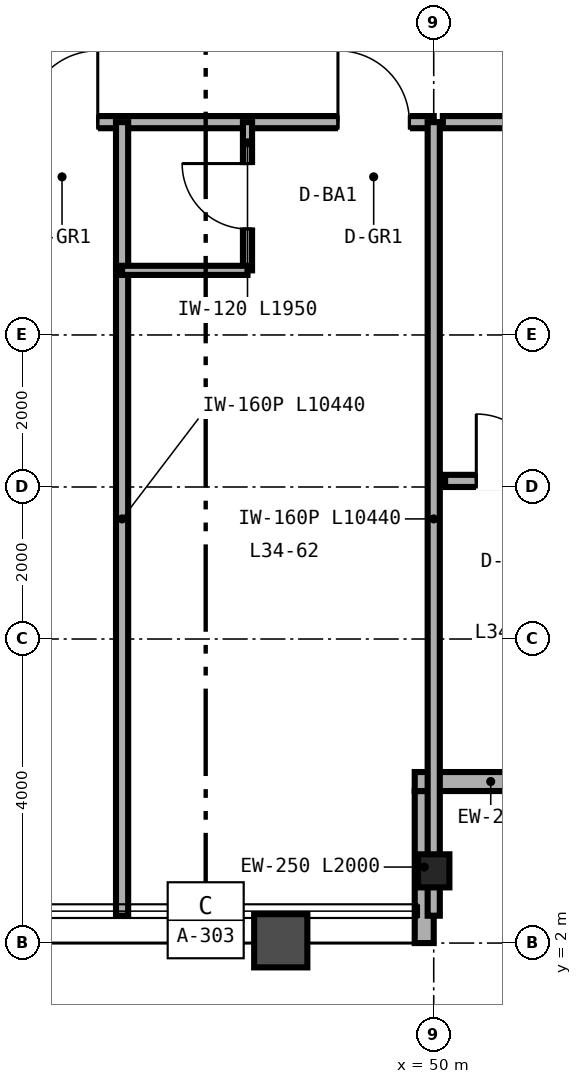
"""IFC4 building model, lengths in metres.
Left out: names, types, materials, properties, quantities, classifications, styles, units other than length and angle.
Written with IfcOpenShell. Run it as: python <this file> out.ifc"""

import sys

from ifc_helpers import new_model, si_unit, direction, frame, frame_2d, origin, origin_2d, place, context, subcontext, project, spatial, rectangle, i_section, extrude, source, transform, mapped, element, fill, save


model = new_model("IFC4")
c1 = context("Model", 3, precision=1e-05, world=origin(), true_north=direction((0.0, 1.0)))
c2 = subcontext(c1, "Body", "Model", "MODEL_VIEW")
j1 = project(units=[si_unit("LENGTHUNIT", "METRE"), si_unit("PLANEANGLEUNIT", "RADIAN")], contexts=[c1])
p1 = place(None, origin())
s1 = spatial("IfcSite", under=j1, at=p1, CompositionType="ELEMENT")
p2 = place(p1, origin())
s2 = spatial("IfcBuilding", under=s1, at=p2, CompositionType="ELEMENT")
p3 = place(p2, frame((0.0, 0.0, 136.8)))
s3 = spatial("IfcBuildingStorey", under=s2, at=p3, CompositionType="ELEMENT", Elevation=136.8)
m1 = source(origin(), c2, "Body", "SweptSolid", [
    extrude(i_section(OverallWidth=0.412, OverallDepth=0.435, WebThickness=0.036, FlangeThickness=0.057, FilletRadius=0.025, at=origin_2d()), origin(), (0.0, 0.0, 1.0), 3.36),
])
p4 = place(p3, frame((50.0, 2.95, 0.0), z_axis=(0.0, 0.0, 1.0), x_axis=(1.0, 0.0, 0.0)))
e1 = element("IfcColumn", 1, at=p4, inside=s3, PredefinedType="COLUMN", context=c2, shape_type="MappedRepresentation", body=[
    mapped(m1, transform((0.0, 0.0, 0.0), scale=1.0)),
])
p5 = place(p3, frame((49.875, 2.0, 0.0), z_axis=(0.0, 0.0, 1.0), x_axis=(0.0, 1.0, 0.0)))
e2 = element("IfcWall", 2, at=p5, inside=s3, PredefinedType="SOLIDWALL", context=c2, shape_type="SweptSolid", body=[
    extrude(rectangle(XDim=2.0, YDim=0.25, at=frame_2d((1.0, 0.0))), origin(), (0.0, 0.0, 1.0), 2.667),
])
p6 = place(p3, frame((49.75, 4.125, 0.0), z_axis=(0.0, 0.0, 1.0), x_axis=(1.0, 0.0, 0.0)))
e3 = element("IfcWall", 3, at=p6, inside=s3, PredefinedType="SOLIDWALL", context=c2, shape_type="SweptSolid", body=[
    extrude(rectangle(XDim=2.0, YDim=0.25, at=frame_2d((1.0, 0.0))), origin(), (0.0, 0.0, 1.0), 3.36),
])
p7 = place(p3, frame((50.12, 12.8, 0.0), z_axis=(0.0, 0.0, 1.0), x_axis=(1.0, 0.0, 0.0)))
e4 = element("IfcWall", 4, at=p7, inside=s3, PredefinedType="PARTITIONING", context=c2, shape_type="SweptSolid", body=[
    extrude(rectangle(XDim=5.68, YDim=0.16, at=frame_2d((2.84, 0.0))), origin(), (0.0, 0.0, 1.0), 3.36),
])
p8 = place(p7, frame((2.36, 0.0, 0.0)))
e5 = element("IfcOpeningElement", 5, at=p8, cuts=e4, PredefinedType="OPENING", context=c2, shape_type="SweptSolid", body=[
    extrude(rectangle(XDim=0.96, YDim=2.15, at=frame_2d((0.48, 1.075))), frame((0.0, 0.09, 0.0), z_axis=(0.0, -1.0, 0.0), x_axis=(1.0, 0.0, 0.0)), (0.0, 0.0, 1.0), 0.18),
])
p9 = place(p3, frame((50.15, 8.08, 0.0), z_axis=(0.0, 0.0, 1.0), x_axis=(1.0, 0.0, 0.0)))
e6 = element("IfcWall", 6, at=p9, inside=s3, PredefinedType="PARTITIONING", context=c2, shape_type="SweptSolid", body=[
    extrude(rectangle(XDim=1.7, YDim=0.16, at=frame_2d((0.85, 0.0))), origin(), (0.0, 0.0, 1.0), 3.36),
])
p10 = place(p9, frame((0.41, 0.0, 0.0)))
e7 = element("IfcOpeningElement", 7, at=p10, cuts=e6, PredefinedType="OPENING", context=c2, shape_type="SweptSolid", body=[
    extrude(rectangle(XDim=0.88, YDim=2.15, at=frame_2d((0.44, 1.075))), frame((0.0, 0.09, 0.0), z_axis=(0.0, -1.0, 0.0), x_axis=(1.0, 0.0, 0.0)), (0.0, 0.0, 1.0), 0.18),
])
p11 = place(p3, frame((14.0, 12.8, 0.0), z_axis=(0.0, 0.0, 1.0), x_axis=(1.0, 0.0, 0.0)))
e8 = element("IfcWall", 8, at=p11, inside=s3, PredefinedType="PARTITIONING", context=c2, shape_type="SweptSolid", body=[
    extrude(rectangle(XDim=36.0, YDim=0.16, at=frame_2d((18.0, 0.0))), origin(), (0.0, 0.0, 1.0), 2.581),
])
p12 = place(p11, frame((2.64, 0.0, 0.0)))
e9 = element("IfcOpeningElement", 9, at=p12, cuts=e8, PredefinedType="OPENING", context=c2, shape_type="SweptSolid", body=[
    extrude(rectangle(XDim=0.94, YDim=2.15, at=frame_2d((0.47, 1.075))), frame((0.0, 0.09, 0.0), z_axis=(0.0, -1.0, 0.0), x_axis=(1.0, 0.0, 0.0)), (0.0, 0.0, 1.0), 0.18),
])
p13 = place(p11, frame((6.54, 0.0, 0.0)))
e10 = element("IfcOpeningElement", 10, at=p13, cuts=e8, PredefinedType="OPENING", context=c2, shape_type="SweptSolid", body=[
    extrude(rectangle(XDim=0.94, YDim=2.15, at=frame_2d((0.47, 1.075))), frame((0.0, 0.09, 0.0), z_axis=(0.0, -1.0, 0.0), x_axis=(1.0, 0.0, 0.0)), (0.0, 0.0, 1.0), 0.18),
])
p14 = place(p11, frame((10.54, 0.0, 0.0)))
e11 = element("IfcOpeningElement", 11, at=p14, cuts=e8, PredefinedType="OPENING", context=c2, shape_type="SweptSolid", body=[
    extrude(rectangle(XDim=0.94, YDim=2.15, at=frame_2d((0.47, 1.075))), frame((0.0, 0.09, 0.0), z_axis=(0.0, -1.0, 0.0), x_axis=(1.0, 0.0, 0.0)), (0.0, 0.0, 1.0), 0.18),
])
p15 = place(p11, frame((14.54, 0.0, 0.0)))
e12 = element("IfcOpeningElement", 12, at=p15, cuts=e8, PredefinedType="OPENING", context=c2, shape_type="SweptSolid", body=[
    extrude(rectangle(XDim=0.94, YDim=2.15, at=frame_2d((0.47, 1.075))), frame((0.0, 0.09, 0.0), z_axis=(0.0, -1.0, 0.0), x_axis=(1.0, 0.0, 0.0)), (0.0, 0.0, 1.0), 0.18),
])
p16 = place(p11, frame((18.54, 0.0, 0.0)))
e13 = element("IfcOpeningElement", 13, at=p16, cuts=e8, PredefinedType="OPENING", context=c2, shape_type="SweptSolid", body=[
    extrude(rectangle(XDim=0.94, YDim=2.15, at=frame_2d((0.47, 1.075))), frame((0.0, 0.09, 0.0), z_axis=(0.0, -1.0, 0.0), x_axis=(1.0, 0.0, 0.0)), (0.0, 0.0, 1.0), 0.18),
])
p17 = place(p11, frame((22.54, 0.0, 0.0)))
e14 = element("IfcOpeningElement", 14, at=p17, cuts=e8, PredefinedType="OPENING", context=c2, shape_type="SweptSolid", body=[
    extrude(rectangle(XDim=0.94, YDim=2.15, at=frame_2d((0.47, 1.075))), frame((0.0, 0.09, 0.0), z_axis=(0.0, -1.0, 0.0), x_axis=(1.0, 0.0, 0.0)), (0.0, 0.0, 1.0), 0.18),
])
p18 = place(p11, frame((26.54, 0.0, 0.0)))
e15 = element("IfcOpeningElement", 15, at=p18, cuts=e8, PredefinedType="OPENING", context=c2, shape_type="SweptSolid", body=[
    extrude(rectangle(XDim=0.94, YDim=2.15, at=frame_2d((0.47, 1.075))), frame((0.0, 0.09, 0.0), z_axis=(0.0, -1.0, 0.0), x_axis=(1.0, 0.0, 0.0)), (0.0, 0.0, 1.0), 0.18),
])
p19 = place(p11, frame((30.64, 0.0, 0.0)))
e16 = element("IfcOpeningElement", 16, at=p19, cuts=e8, PredefinedType="OPENING", context=c2, shape_type="SweptSolid", body=[
    extrude(rectangle(XDim=0.94, YDim=2.15, at=frame_2d((0.47, 1.075))), frame((0.0, 0.09, 0.0), z_axis=(0.0, -1.0, 0.0), x_axis=(1.0, 0.0, 0.0)), (0.0, 0.0, 1.0), 0.18),
])
p20 = place(p11, frame((34.74, 0.0, 0.0)))
e17 = element("IfcOpeningElement", 17, at=p20, cuts=e8, PredefinedType="OPENING", context=c2, shape_type="SweptSolid", body=[
    extrude(rectangle(XDim=0.94, YDim=2.15, at=frame_2d((0.47, 1.075))), frame((0.0, 0.09, 0.0), z_axis=(0.0, -1.0, 0.0), x_axis=(1.0, 0.0, 0.0)), (0.0, 0.0, 1.0), 0.18),
])
for number, where, z_axis, x_axis in (
    (18, (50.0, 2.36, 0.0), (0.0, 0.0, 1.0), (0.0, 1.0, 0.0)),
    (19, (45.9, 2.36, 0.0), (0.0, 0.0, 1.0), (0.0, 1.0, 0.0)),
):
    element("IfcWall", number, at=place(p3, frame(where, z_axis=z_axis, x_axis=x_axis)), inside=s3, PredefinedType="PARTITIONING", context=c2, shape_type="SweptSolid", body=[
        extrude(rectangle(XDim=10.44, YDim=0.16, at=frame_2d((5.22, 0.0))), origin(), (0.0, 0.0, 1.0), 2.667),
    ])
p21 = place(p3, frame((47.55, 10.85, 0.0), z_axis=(0.0, 0.0, 1.0), x_axis=(0.0, 1.0, 0.0)))
e20 = element("IfcWall", 20, at=p21, inside=s3, PredefinedType="PARTITIONING", context=c2, shape_type="SweptSolid", body=[
    extrude(rectangle(XDim=1.95, YDim=0.12, at=frame_2d((0.975, 0.0))), origin(), (0.0, 0.0, 1.0), 3.36),
])
p22 = place(p21, frame((0.545, 0.0, 0.0)))
e21 = element("IfcOpeningElement", 21, at=p22, cuts=e20, PredefinedType="OPENING", context=c2, shape_type="SweptSolid", body=[
    extrude(rectangle(XDim=0.86, YDim=2.1, at=frame_2d((0.43, 1.05))), frame((0.0, 0.07, 0.0), z_axis=(0.0, -1.0, 0.0), x_axis=(1.0, 0.0, 0.0)), (0.0, 0.0, 1.0), 0.14),
])
p23 = place(p3, frame((45.9, 10.85, 0.0), z_axis=(0.0, 0.0, 1.0), x_axis=(1.0, 0.0, 0.0)))
e22 = element("IfcWall", 22, at=p23, inside=s3, PredefinedType="PARTITIONING", context=c2, shape_type="SweptSolid", body=[
    extrude(rectangle(XDim=1.65, YDim=0.12, at=frame_2d((0.825, 0.0))), origin(), (0.0, 0.0, 1.0), 3.36),
])
m2 = source(origin(), c2, "Body", "SweptSolid", [
    extrude(rectangle(XDim=0.88, YDim=2.15, at=frame_2d((0.44, 1.075))), frame((0.0, 0.025, 0.0), z_axis=(0.0, -1.0, 0.0), x_axis=(1.0, 0.0, 0.0)), (0.0, 0.0, 1.0), 0.05),
])
p24 = place(p10, origin())
e23 = element("IfcDoor", 23, at=p24, inside=s3, OperationType="SINGLE_SWING_LEFT", PredefinedType="DOOR", context=c2, shape_type="MappedRepresentation", body=[
    mapped(m2, transform((0.0, 0.0, 0.0), scale=1.0)),
])
fill(e7, e23)
m3 = source(origin(), c2, "Body", "SweptSolid", [
    extrude(rectangle(XDim=0.86, YDim=2.1, at=frame_2d((0.43, 1.05))), frame((0.0, 0.025, 0.0), z_axis=(0.0, -1.0, 0.0), x_axis=(1.0, 0.0, 0.0)), (0.0, 0.0, 1.0), 0.05),
])
p25 = place(p22, origin())
e24 = element("IfcDoor", 24, at=p25, inside=s3, OperationType="SINGLE_SWING_RIGHT", PredefinedType="DOOR", context=c2, shape_type="MappedRepresentation", body=[
    mapped(m3, transform((0.0, 0.0, 0.0), scale=1.0)),
])
fill(e21, e24)
m4 = source(origin(), c2, "Body", "SweptSolid", [
    extrude(rectangle(XDim=0.94, YDim=2.15, at=frame_2d((0.47, 1.075))), frame((0.0, 0.025, 0.0), z_axis=(0.0, -1.0, 0.0), x_axis=(1.0, 0.0, 0.0)), (0.0, 0.0, 1.0), 0.05),
])
p26 = place(p19, origin())
e25 = element("IfcDoor", 25, at=p26, inside=s3, OperationType="SINGLE_SWING_RIGHT", PredefinedType="DOOR", context=c2, shape_type="MappedRepresentation", body=[
    mapped(m4, transform((0.0, 0.0, 0.0), scale=1.0)),
])
fill(e16, e25)
p27 = place(p20, origin())
e26 = element("IfcDoor", 26, at=p27, inside=s3, OperationType="SINGLE_SWING_LEFT", PredefinedType="DOOR", context=c2, shape_type="MappedRepresentation", body=[
    mapped(m4, transform((0.0, 0.0, 0.0), scale=1.0)),
])
fill(e17, e26)
save(model, sys.argv[1])
